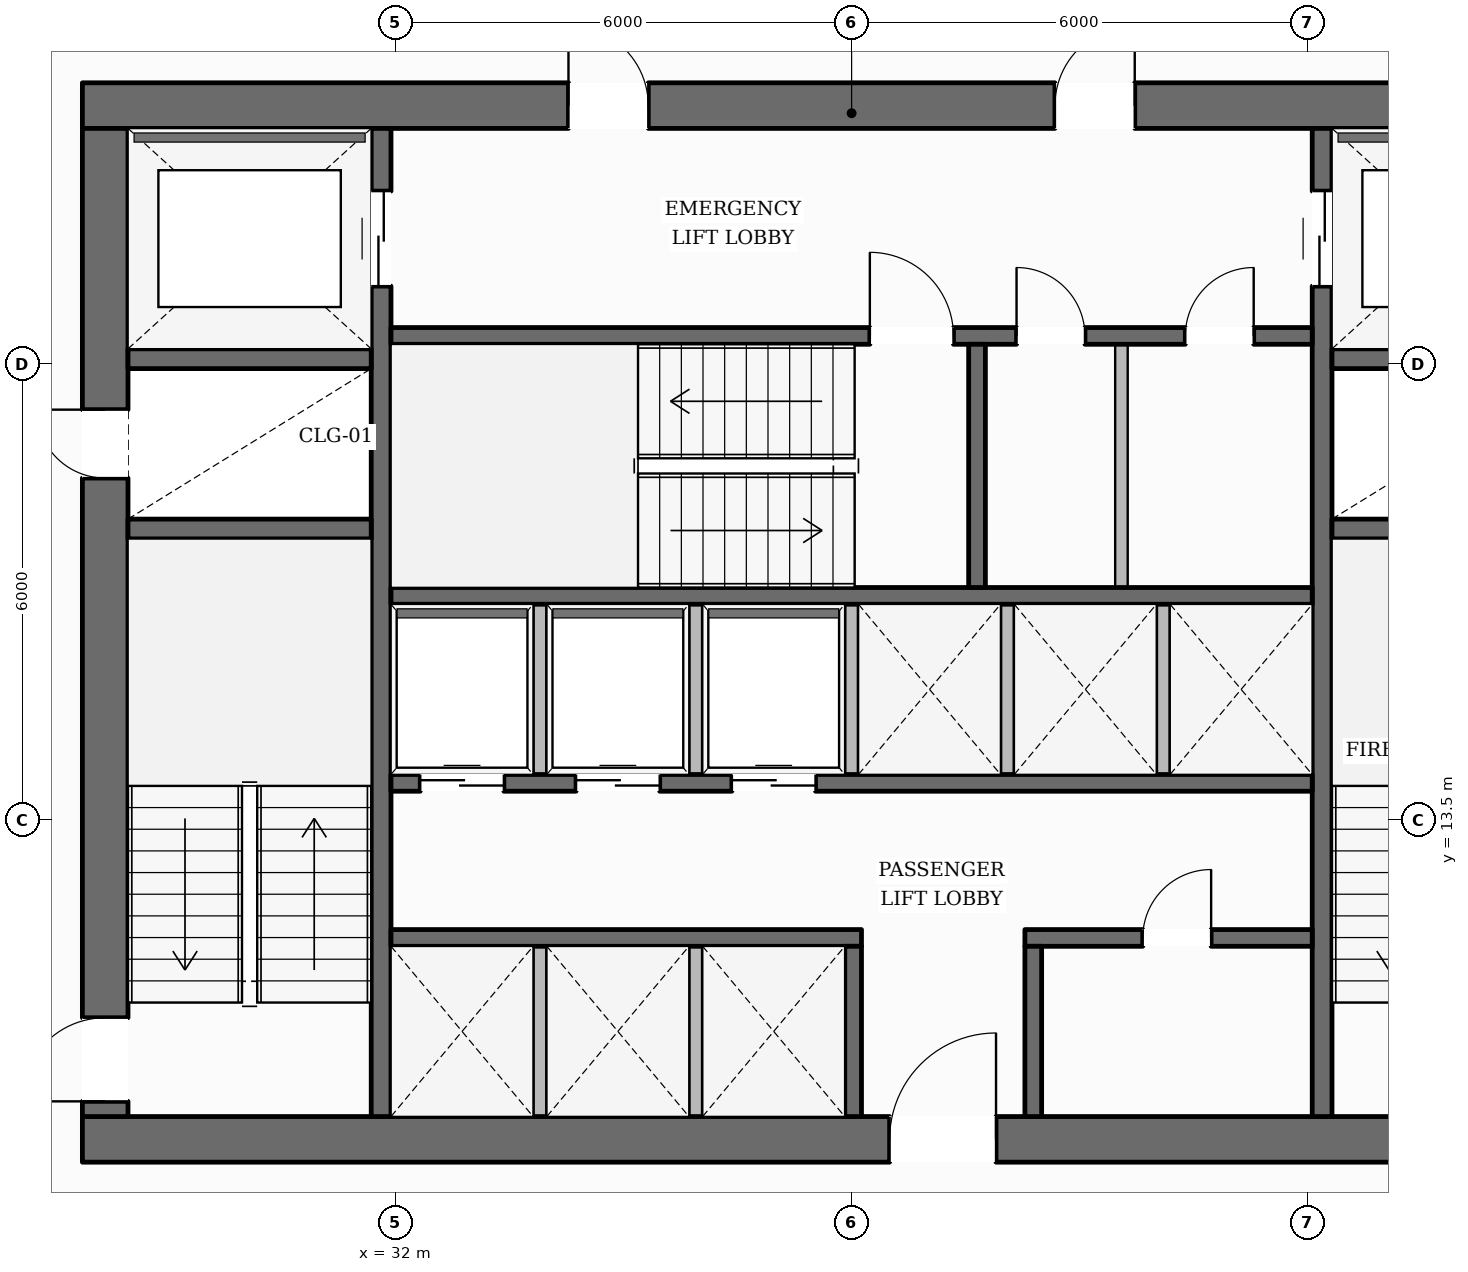
"""IFC4 building model, lengths in metres.
Left out: names, types, materials, properties, quantities, classifications, styles, units other than length and angle.
Written with IfcOpenShell. Run it as: python <this file> out.ifc"""

import sys

from ifc_helpers import new_model, si_unit, direction, frame, frame_2d, origin, place, context, subcontext, project, spatial, rectangle, extrude, element, fill, save


model = new_model("IFC4")
c1 = context("Model", 3, precision=1e-05, world=origin(), true_north=direction((0.0, 1.0)))
c2 = subcontext(c1, "Body", "Model", "MODEL_VIEW")
j1 = project(units=[si_unit("LENGTHUNIT", "METRE"), si_unit("PLANEANGLEUNIT", "RADIAN")], contexts=[c1])
p1 = place(None, origin())
s1 = spatial("IfcSite", under=j1, at=p1, CompositionType="ELEMENT")
p2 = place(p1, origin())
s2 = spatial("IfcBuilding", under=s1, at=p2, CompositionType="ELEMENT")
p3 = place(p2, frame((0.0, 0.0, 36.8)))
s3 = spatial("IfcBuildingStorey", under=s2, at=p3, CompositionType="ELEMENT", Elevation=36.8)
p4 = place(p3, frame((27.88, 9.3, 0.0), z_axis=(0.0, 0.0, 1.0), x_axis=(1.0, 0.0, 0.0)))
e1 = element("IfcWall", 1, at=p4, inside=s3, PredefinedType="SOLIDWALL", context=c2, shape_type="SweptSolid", body=[
    extrude(rectangle(XDim=20.24, YDim=0.6, at=frame_2d((10.12, 0.0))), origin(), (0.0, 0.0, 1.0), 3.59),
])
p5 = place(p4, frame((10.62, 0.0, 0.0)))
e2 = element("IfcOpeningElement", 2, at=p5, cuts=e1, PredefinedType="OPENING", context=c2, shape_type="SweptSolid", body=[
    extrude(rectangle(XDim=1.4, YDim=2.2, at=frame_2d((0.7, 1.1))), frame((0.0, 0.31, 0.0), z_axis=(0.0, -1.0, 0.0), x_axis=(1.0, 0.0, 0.0)), (0.0, 0.0, 1.0), 0.62),
])
p6 = place(p3, frame((27.88, 22.9, 0.0), z_axis=(0.0, 0.0, 1.0), x_axis=(1.0, 0.0, 0.0)))
e3 = element("IfcWall", 3, at=p6, inside=s3, PredefinedType="SOLIDWALL", context=c2, shape_type="SweptSolid", body=[
    extrude(rectangle(XDim=20.24, YDim=0.6, at=frame_2d((10.12, 0.0))), origin(), (0.0, 0.0, 1.0), 3.59),
])
p7 = place(p6, frame((6.395, 0.0, 0.0)))
e4 = element("IfcOpeningElement", 4, at=p7, cuts=e3, PredefinedType="OPENING", context=c2, shape_type="SweptSolid", body=[
    extrude(rectangle(XDim=1.05, YDim=2.15, at=frame_2d((0.525, 1.075))), frame((0.0, 0.31, 0.0), z_axis=(0.0, -1.0, 0.0), x_axis=(1.0, 0.0, 0.0)), (0.0, 0.0, 1.0), 0.62),
])
p8 = place(p6, frame((12.795, 0.0, 0.0)))
e5 = element("IfcOpeningElement", 5, at=p8, cuts=e3, PredefinedType="OPENING", context=c2, shape_type="SweptSolid", body=[
    extrude(rectangle(XDim=1.05, YDim=2.15, at=frame_2d((0.525, 1.075))), frame((0.0, 0.31, 0.0), z_axis=(0.0, -1.0, 0.0), x_axis=(1.0, 0.0, 0.0)), (0.0, 0.0, 1.0), 0.62),
])
p9 = place(p3, frame((28.18, 9.6, 0.0), z_axis=(0.0, 0.0, 1.0), x_axis=(0.0, 1.0, 0.0)))
e6 = element("IfcWall", 6, at=p9, inside=s3, PredefinedType="SOLIDWALL", context=c2, shape_type="SweptSolid", body=[
    extrude(rectangle(XDim=13.0, YDim=0.6, at=frame_2d((6.5, 0.0))), origin(), (0.0, 0.0, 1.0), 3.59),
])
p10 = place(p9, frame((0.2, 0.0, 0.0)))
e7 = element("IfcOpeningElement", 7, at=p10, cuts=e6, PredefinedType="OPENING", context=c2, shape_type="SweptSolid", body=[
    extrude(rectangle(XDim=1.1, YDim=2.15, at=frame_2d((0.55, 1.075))), frame((0.0, 0.31, 0.0), z_axis=(0.0, -1.0, 0.0), x_axis=(1.0, 0.0, 0.0)), (0.0, 0.0, 1.0), 0.62),
])
p11 = place(p9, frame((8.4, 0.0, 0.0)))
e8 = element("IfcOpeningElement", 8, at=p11, cuts=e6, PredefinedType="OPENING", context=c2, shape_type="SweptSolid", body=[
    extrude(rectangle(XDim=0.9, YDim=2.1, at=frame_2d((0.45, 1.05))), frame((0.0, 0.31, 0.0), z_axis=(0.0, -1.0, 0.0), x_axis=(1.0, 0.0, 0.0)), (0.0, 0.0, 1.0), 0.62),
])
p12 = place(p3, frame((31.81, 9.6, 0.0), z_axis=(0.0, 0.0, 1.0), x_axis=(0.0, 1.0, 0.0)))
e9 = element("IfcWall", 9, at=p12, inside=s3, PredefinedType="SHEAR", context=c2, shape_type="SweptSolid", body=[
    extrude(rectangle(XDim=13.0, YDim=0.26, at=frame_2d((6.5, 0.0))), origin(), (0.0, 0.0, 1.0), 3.59),
])
p13 = place(p12, frame((10.925, 0.0, 0.0)))
e10 = element("IfcOpeningElement", 10, at=p13, cuts=e9, PredefinedType="OPENING", context=c2, shape_type="SweptSolid", body=[
    extrude(rectangle(XDim=1.25, YDim=2.25, at=frame_2d((0.625, 1.125))), frame((0.0, 0.14, 0.0), z_axis=(0.0, -1.0, 0.0), x_axis=(1.0, 0.0, 0.0)), (0.0, 0.0, 1.0), 0.28),
])
p14 = place(p3, frame((44.19, 9.6, 0.0), z_axis=(0.0, 0.0, 1.0), x_axis=(0.0, 1.0, 0.0)))
e11 = element("IfcWall", 11, at=p14, inside=s3, PredefinedType="SHEAR", context=c2, shape_type="SweptSolid", body=[
    extrude(rectangle(XDim=13.0, YDim=0.26, at=frame_2d((6.5, 0.0))), origin(), (0.0, 0.0, 1.0), 3.59),
])
p15 = place(p14, frame((10.925, 0.0, 0.0)))
e12 = element("IfcOpeningElement", 12, at=p15, cuts=e11, PredefinedType="OPENING", context=c2, shape_type="SweptSolid", body=[
    extrude(rectangle(XDim=1.25, YDim=2.25, at=frame_2d((0.625, 1.125))), frame((0.0, 0.14, 0.0), z_axis=(0.0, -1.0, 0.0), x_axis=(1.0, 0.0, 0.0)), (0.0, 0.0, 1.0), 0.28),
])
for number, where, z_axis, x_axis in (
    (13, (28.48, 17.33, 0.0), (0.0, 0.0, 1.0), (1.0, 0.0, 0.0)),
    (14, (28.48, 19.57, 0.0), (0.0, 0.0, 1.0), (1.0, 0.0, 0.0)),
    (15, (44.32, 17.33, 0.0), (0.0, 0.0, 1.0), (1.0, 0.0, 0.0)),
    (16, (44.32, 19.57, 0.0), (0.0, 0.0, 1.0), (1.0, 0.0, 0.0)),
):
    element("IfcWall", number, at=place(p3, frame(where, z_axis=z_axis, x_axis=x_axis)), inside=s3, PredefinedType="SHEAR", context=c2, shape_type="SweptSolid", body=[
        extrude(rectangle(XDim=3.2, YDim=0.26, at=frame_2d((1.6, 0.0))), origin(), (0.0, 0.0, 1.0), 3.59),
    ])
p16 = place(p3, frame((31.94, 19.87, 0.0), z_axis=(0.0, 0.0, 1.0), x_axis=(1.0, 0.0, 0.0)))
e17 = element("IfcWall", 17, at=p16, inside=s3, PredefinedType="SOLIDWALL", context=c2, shape_type="SweptSolid", body=[
    extrude(rectangle(XDim=12.12, YDim=0.22, at=frame_2d((6.06, 0.0))), origin(), (0.0, 0.0, 1.0), 3.59),
])
p17 = place(p16, frame((6.3, 0.0, 0.0)))
e18 = element("IfcOpeningElement", 18, at=p17, cuts=e17, PredefinedType="OPENING", context=c2, shape_type="SweptSolid", body=[
    extrude(rectangle(XDim=1.1, YDim=2.15, at=frame_2d((0.55, 1.075))), frame((0.0, 0.12, 0.0), z_axis=(0.0, -1.0, 0.0), x_axis=(1.0, 0.0, 0.0)), (0.0, 0.0, 1.0), 0.24),
])
p18 = place(p16, frame((8.23, 0.0, 0.0)))
e19 = element("IfcOpeningElement", 19, at=p18, cuts=e17, PredefinedType="OPENING", context=c2, shape_type="SweptSolid", body=[
    extrude(rectangle(XDim=0.9, YDim=2.1, at=frame_2d((0.45, 1.05))), frame((0.0, 0.12, 0.0), z_axis=(0.0, -1.0, 0.0), x_axis=(1.0, 0.0, 0.0)), (0.0, 0.0, 1.0), 0.24),
])
p19 = place(p16, frame((10.45, 0.0, 0.0)))
e20 = element("IfcOpeningElement", 20, at=p19, cuts=e17, PredefinedType="OPENING", context=c2, shape_type="SweptSolid", body=[
    extrude(rectangle(XDim=0.9, YDim=2.1, at=frame_2d((0.45, 1.05))), frame((0.0, 0.12, 0.0), z_axis=(0.0, -1.0, 0.0), x_axis=(1.0, 0.0, 0.0)), (0.0, 0.0, 1.0), 0.24),
])
p20 = place(p3, frame((31.94, 16.45, 0.0), z_axis=(0.0, 0.0, 1.0), x_axis=(1.0, 0.0, 0.0)))
e21 = element("IfcWall", 21, at=p20, inside=s3, PredefinedType="SOLIDWALL", context=c2, shape_type="SweptSolid", body=[
    extrude(rectangle(XDim=12.12, YDim=0.22, at=frame_2d((6.06, 0.0))), origin(), (0.0, 0.0, 1.0), 3.59),
])
p21 = place(p3, frame((39.65, 16.56, 0.0), z_axis=(0.0, 0.0, 1.0), x_axis=(0.0, 1.0, 0.0)))
e22 = element("IfcWall", 22, at=p21, inside=s3, PredefinedType="SOLIDWALL", context=c2, shape_type="SweptSolid", body=[
    extrude(rectangle(XDim=3.2, YDim=0.22, at=frame_2d((1.6, 0.0))), origin(), (0.0, 0.0, 1.0), 3.59),
])
p22 = place(p3, frame((31.94, 13.99, 0.0), z_axis=(0.0, 0.0, 1.0), x_axis=(1.0, 0.0, 0.0)))
e23 = element("IfcWall", 23, at=p22, inside=s3, PredefinedType="SOLIDWALL", context=c2, shape_type="SweptSolid", body=[
    extrude(rectangle(XDim=12.12, YDim=0.22, at=frame_2d((6.06, 0.0))), origin(), (0.0, 0.0, 1.0), 3.59),
])
p23 = place(p22, frame((0.385, 0.0, 0.0)))
e24 = element("IfcOpeningElement", 24, at=p23, cuts=e23, PredefinedType="OPENING", context=c2, shape_type="SweptSolid", body=[
    extrude(rectangle(XDim=1.1, YDim=2.2, at=frame_2d((0.55, 1.1))), frame((0.0, 0.12, 0.0), z_axis=(0.0, -1.0, 0.0), x_axis=(1.0, 0.0, 0.0)), (0.0, 0.0, 1.0), 0.24),
])
p24 = place(p22, frame((2.435, 0.0, 0.0)))
e25 = element("IfcOpeningElement", 25, at=p24, cuts=e23, PredefinedType="OPENING", context=c2, shape_type="SweptSolid", body=[
    extrude(rectangle(XDim=1.1, YDim=2.2, at=frame_2d((0.55, 1.1))), frame((0.0, 0.12, 0.0), z_axis=(0.0, -1.0, 0.0), x_axis=(1.0, 0.0, 0.0)), (0.0, 0.0, 1.0), 0.24),
])
p25 = place(p22, frame((4.485, 0.0, 0.0)))
e26 = element("IfcOpeningElement", 26, at=p25, cuts=e23, PredefinedType="OPENING", context=c2, shape_type="SweptSolid", body=[
    extrude(rectangle(XDim=1.1, YDim=2.2, at=frame_2d((0.55, 1.1))), frame((0.0, 0.12, 0.0), z_axis=(0.0, -1.0, 0.0), x_axis=(1.0, 0.0, 0.0)), (0.0, 0.0, 1.0), 0.24),
])
p26 = place(p3, frame((31.94, 11.95, 0.0), z_axis=(0.0, 0.0, 1.0), x_axis=(1.0, 0.0, 0.0)))
e27 = element("IfcWall", 27, at=p26, inside=s3, PredefinedType="SOLIDWALL", context=c2, shape_type="SweptSolid", body=[
    extrude(rectangle(XDim=6.19, YDim=0.22, at=frame_2d((3.095, 0.0))), origin(), (0.0, 0.0, 1.0), 3.59),
])
p27 = place(p3, frame((40.28, 11.95, 0.0), z_axis=(0.0, 0.0, 1.0), x_axis=(1.0, 0.0, 0.0)))
e28 = element("IfcWall", 28, at=p27, inside=s3, PredefinedType="SOLIDWALL", context=c2, shape_type="SweptSolid", body=[
    extrude(rectangle(XDim=3.78, YDim=0.22, at=frame_2d((1.89, 0.0))), origin(), (0.0, 0.0, 1.0), 3.59),
])
p28 = place(p27, frame((1.55, 0.0, 0.0)))
e29 = element("IfcOpeningElement", 29, at=p28, cuts=e28, PredefinedType="OPENING", context=c2, shape_type="SweptSolid", body=[
    extrude(rectangle(XDim=0.9, YDim=2.1, at=frame_2d((0.45, 1.05))), frame((0.0, 0.12, 0.0), z_axis=(0.0, -1.0, 0.0), x_axis=(1.0, 0.0, 0.0)), (0.0, 0.0, 1.0), 0.24),
])
for number, where, z_axis, x_axis in (
    (30, (38.02, 9.6, 0.0), (0.0, 0.0, 1.0), (0.0, 1.0, 0.0)),
    (31, (40.39, 9.6, 0.0), (0.0, 0.0, 1.0), (0.0, 1.0, 0.0)),
):
    element("IfcWall", number, at=place(p3, frame(where, z_axis=z_axis, x_axis=x_axis)), inside=s3, PredefinedType="SOLIDWALL", context=c2, shape_type="SweptSolid", body=[
        extrude(rectangle(XDim=2.24, YDim=0.22, at=frame_2d((1.12, 0.0))), origin(), (0.0, 0.0, 1.0), 3.59),
    ])
p29 = place(p3, frame((13.343, 14.75, 0.0), z_axis=(0.0, 0.0, 1.0), x_axis=(0.495088404126, 0.868842604906, 0.0)))
e32 = element("IfcWall", 32, at=p29, inside=s3, PredefinedType="STANDARD", context=c2, shape_type="SweptSolid", body=[
    extrude(rectangle(XDim=34.399, YDim=0.38, at=frame_2d((17.2, 0.0))), origin(), (0.0, 0.0, 1.0), 2.97),
])
p30 = place(p29, frame((30.307, 0.0, 0.65)))
e33 = element("IfcOpeningElement", 33, at=p30, cuts=e32, PredefinedType="OPENING", context=c2, shape_type="SweptSolid", body=[
    extrude(rectangle(XDim=1.65, YDim=1.75, at=frame_2d((0.825, 0.875))), frame((0.0, 0.2, 0.0), z_axis=(0.0, -1.0, 0.0), x_axis=(1.0, 0.0, 0.0)), (0.0, 0.0, 1.0), 0.4),
])
p31 = place(p29, frame((24.733, 0.0, 0.65)))
e34 = element("IfcOpeningElement", 34, at=p31, cuts=e32, PredefinedType="OPENING", context=c2, shape_type="SweptSolid", body=[
    extrude(rectangle(XDim=1.65, YDim=1.75, at=frame_2d((0.825, 0.875))), frame((0.0, 0.2, 0.0), z_axis=(0.0, -1.0, 0.0), x_axis=(1.0, 0.0, 0.0)), (0.0, 0.0, 1.0), 0.4),
])
p32 = place(p29, frame((13.585, 0.0, 0.65)))
e35 = element("IfcOpeningElement", 35, at=p32, cuts=e32, PredefinedType="OPENING", context=c2, shape_type="SweptSolid", body=[
    extrude(rectangle(XDim=1.65, YDim=1.75, at=frame_2d((0.825, 0.875))), frame((0.0, 0.2, 0.0), z_axis=(0.0, -1.0, 0.0), x_axis=(1.0, 0.0, 0.0)), (0.0, 0.0, 1.0), 0.4),
])
p33 = place(p29, frame((8.011, 0.0, 0.65)))
e36 = element("IfcOpeningElement", 36, at=p33, cuts=e32, PredefinedType="OPENING", context=c2, shape_type="SweptSolid", body=[
    extrude(rectangle(XDim=1.65, YDim=1.75, at=frame_2d((0.825, 0.875))), frame((0.0, 0.2, 0.0), z_axis=(0.0, -1.0, 0.0), x_axis=(1.0, 0.0, 0.0)), (0.0, 0.0, 1.0), 0.4),
])
p34 = place(p29, frame((2.437, 0.0, 0.65)))
e37 = element("IfcOpeningElement", 37, at=p34, cuts=e32, PredefinedType="OPENING", context=c2, shape_type="SweptSolid", body=[
    extrude(rectangle(XDim=1.65, YDim=1.75, at=frame_2d((0.825, 0.875))), frame((0.0, 0.2, 0.0), z_axis=(0.0, -1.0, 0.0), x_axis=(1.0, 0.0, 0.0)), (0.0, 0.0, 1.0), 0.4),
])
for number, where, z_axis, x_axis in (
    (38, (33.9, 9.6, 0.0), (0.0, 0.0, 1.0), (0.0, 1.0, 0.0)),
    (39, (35.95, 9.6, 0.0), (0.0, 0.0, 1.0), (0.0, 1.0, 0.0)),
    (40, (33.9, 14.1, 0.0), (0.0, 0.0, 1.0), (0.0, 1.0, 0.0)),
    (41, (35.95, 14.1, 0.0), (0.0, 0.0, 1.0), (0.0, 1.0, 0.0)),
    (42, (38.0, 14.1, 0.0), (0.0, 0.0, 1.0), (0.0, 1.0, 0.0)),
    (43, (40.05, 14.1, 0.0), (0.0, 0.0, 1.0), (0.0, 1.0, 0.0)),
    (44, (42.1, 14.1, 0.0), (0.0, 0.0, 1.0), (0.0, 1.0, 0.0)),
):
    element("IfcWall", number, at=place(p3, frame(where, z_axis=z_axis, x_axis=x_axis)), inside=s3, PredefinedType="PARTITIONING", context=c2, shape_type="SweptSolid", body=[
        extrude(rectangle(XDim=2.24, YDim=0.165, at=frame_2d((1.12, 0.0))), origin(), (0.0, 0.0, 1.0), 3.59),
    ])
p35 = place(p3, frame((41.55, 16.56, 0.0), z_axis=(0.0, 0.0, 1.0), x_axis=(0.0, 1.0, 0.0)))
e45 = element("IfcWall", 45, at=p35, inside=s3, PredefinedType="PARTITIONING", context=c2, shape_type="SweptSolid", body=[
    extrude(rectangle(XDim=3.2, YDim=0.165, at=frame_2d((1.6, 0.0))), origin(), (0.0, 0.0, 1.0), 3.59),
])
p36 = place(p10, origin())
e46 = element("IfcDoor", 46, at=p36, inside=s3, OperationType="SINGLE_SWING_LEFT", PredefinedType="DOOR", context=c2, shape_type="SweptSolid", body=[
    extrude(rectangle(XDim=1.1, YDim=2.15, at=frame_2d((0.55, 1.075))), frame((0.0, 0.025, 0.0), z_axis=(0.0, -1.0, 0.0), x_axis=(1.0, 0.0, 0.0)), (0.0, 0.0, 1.0), 0.05),
])
fill(e7, e46)
p37 = place(p17, origin())
e47 = element("IfcDoor", 47, at=p37, inside=s3, OperationType="SINGLE_SWING_LEFT", PredefinedType="DOOR", context=c2, shape_type="SweptSolid", body=[
    extrude(rectangle(XDim=1.1, YDim=2.15, at=frame_2d((0.55, 1.075))), frame((0.0, 0.025, 0.0), z_axis=(0.0, -1.0, 0.0), x_axis=(1.0, 0.0, 0.0)), (0.0, 0.0, 1.0), 0.05),
])
fill(e18, e47)
p38 = place(p11, origin())
e48 = element("IfcDoor", 48, at=p38, inside=s3, OperationType="SINGLE_SWING_RIGHT", PredefinedType="DOOR", context=c2, shape_type="SweptSolid", body=[
    extrude(rectangle(XDim=0.9, YDim=2.1, at=frame_2d((0.45, 1.05))), frame((0.0, 0.025, 0.0), z_axis=(0.0, -1.0, 0.0), x_axis=(1.0, 0.0, 0.0)), (0.0, 0.0, 1.0), 0.05),
])
fill(e8, e48)
p39 = place(p7, origin())
e49 = element("IfcDoor", 49, at=p39, inside=s3, OperationType="SINGLE_SWING_LEFT", PredefinedType="DOOR", context=c2, shape_type="SweptSolid", body=[
    extrude(rectangle(XDim=1.05, YDim=2.15, at=frame_2d((0.525, 1.075))), frame((0.0, 0.025, 0.0), z_axis=(0.0, -1.0, 0.0), x_axis=(1.0, 0.0, 0.0)), (0.0, 0.0, 1.0), 0.05),
])
fill(e4, e49)
p40 = place(p8, origin())
e50 = element("IfcDoor", 50, at=p40, inside=s3, OperationType="SINGLE_SWING_RIGHT", PredefinedType="DOOR", context=c2, shape_type="SweptSolid", body=[
    extrude(rectangle(XDim=1.05, YDim=2.15, at=frame_2d((0.525, 1.075))), frame((0.0, 0.025, 0.0), z_axis=(0.0, -1.0, 0.0), x_axis=(1.0, 0.0, 0.0)), (0.0, 0.0, 1.0), 0.05),
])
fill(e5, e50)
p41 = place(p13, origin())
e51 = element("IfcDoor", 51, at=p41, inside=s3, OperationType="DOUBLE_DOOR_SLIDING", PredefinedType="DOOR", context=c2, shape_type="SweptSolid", body=[
    extrude(rectangle(XDim=1.25, YDim=2.25, at=frame_2d((0.625, 1.125))), frame((0.0, 0.025, 0.0), z_axis=(0.0, -1.0, 0.0), x_axis=(1.0, 0.0, 0.0)), (0.0, 0.0, 1.0), 0.05),
])
fill(e10, e51)
p42 = place(p15, origin())
e52 = element("IfcDoor", 52, at=p42, inside=s3, OperationType="DOUBLE_DOOR_SLIDING", PredefinedType="DOOR", context=c2, shape_type="SweptSolid", body=[
    extrude(rectangle(XDim=1.25, YDim=2.25, at=frame_2d((0.625, 1.125))), frame((0.0, 0.025, 0.0), z_axis=(0.0, -1.0, 0.0), x_axis=(1.0, 0.0, 0.0)), (0.0, 0.0, 1.0), 0.05),
])
fill(e12, e52)
p43 = place(p5, origin())
e53 = element("IfcDoor", 53, at=p43, inside=s3, OperationType="SINGLE_SWING_RIGHT", PredefinedType="DOOR", context=c2, shape_type="SweptSolid", body=[
    extrude(rectangle(XDim=1.4, YDim=2.2, at=frame_2d((0.7, 1.1))), frame((0.0, 0.025, 0.0), z_axis=(0.0, -1.0, 0.0), x_axis=(1.0, 0.0, 0.0)), (0.0, 0.0, 1.0), 0.05),
])
fill(e2, e53)
p44 = place(p23, origin())
e54 = element("IfcDoor", 54, at=p44, inside=s3, OperationType="DOUBLE_DOOR_SLIDING", PredefinedType="DOOR", context=c2, shape_type="SweptSolid", body=[
    extrude(rectangle(XDim=1.1, YDim=2.2, at=frame_2d((0.55, 1.1))), frame((0.0, 0.025, 0.0), z_axis=(0.0, -1.0, 0.0), x_axis=(1.0, 0.0, 0.0)), (0.0, 0.0, 1.0), 0.05),
])
fill(e24, e54)
p45 = place(p24, origin())
e55 = element("IfcDoor", 55, at=p45, inside=s3, OperationType="DOUBLE_DOOR_SLIDING", PredefinedType="DOOR", context=c2, shape_type="SweptSolid", body=[
    extrude(rectangle(XDim=1.1, YDim=2.2, at=frame_2d((0.55, 1.1))), frame((0.0, 0.025, 0.0), z_axis=(0.0, -1.0, 0.0), x_axis=(1.0, 0.0, 0.0)), (0.0, 0.0, 1.0), 0.05),
])
fill(e25, e55)
p46 = place(p25, origin())
e56 = element("IfcDoor", 56, at=p46, inside=s3, OperationType="DOUBLE_DOOR_SLIDING", PredefinedType="DOOR", context=c2, shape_type="SweptSolid", body=[
    extrude(rectangle(XDim=1.1, YDim=2.2, at=frame_2d((0.55, 1.1))), frame((0.0, 0.025, 0.0), z_axis=(0.0, -1.0, 0.0), x_axis=(1.0, 0.0, 0.0)), (0.0, 0.0, 1.0), 0.05),
])
fill(e26, e56)
p47 = place(p18, origin())
e57 = element("IfcDoor", 57, at=p47, inside=s3, OperationType="SINGLE_SWING_LEFT", PredefinedType="DOOR", context=c2, shape_type="SweptSolid", body=[
    extrude(rectangle(XDim=0.9, YDim=2.1, at=frame_2d((0.45, 1.05))), frame((0.0, 0.025, 0.0), z_axis=(0.0, -1.0, 0.0), x_axis=(1.0, 0.0, 0.0)), (0.0, 0.0, 1.0), 0.05),
])
fill(e19, e57)
p48 = place(p19, origin())
e58 = element("IfcDoor", 58, at=p48, inside=s3, OperationType="SINGLE_SWING_RIGHT", PredefinedType="DOOR", context=c2, shape_type="SweptSolid", body=[
    extrude(rectangle(XDim=0.9, YDim=2.1, at=frame_2d((0.45, 1.05))), frame((0.0, 0.025, 0.0), z_axis=(0.0, -1.0, 0.0), x_axis=(1.0, 0.0, 0.0)), (0.0, 0.0, 1.0), 0.05),
])
fill(e20, e58)
p49 = place(p28, origin())
e59 = element("IfcDoor", 59, at=p49, inside=s3, OperationType="SINGLE_SWING_RIGHT", PredefinedType="DOOR", context=c2, shape_type="SweptSolid", body=[
    extrude(rectangle(XDim=0.9, YDim=2.1, at=frame_2d((0.45, 1.05))), frame((0.0, 0.025, 0.0), z_axis=(0.0, -1.0, 0.0), x_axis=(1.0, 0.0, 0.0)), (0.0, 0.0, 1.0), 0.05),
])
fill(e29, e59)
save(model, sys.argv[1])
